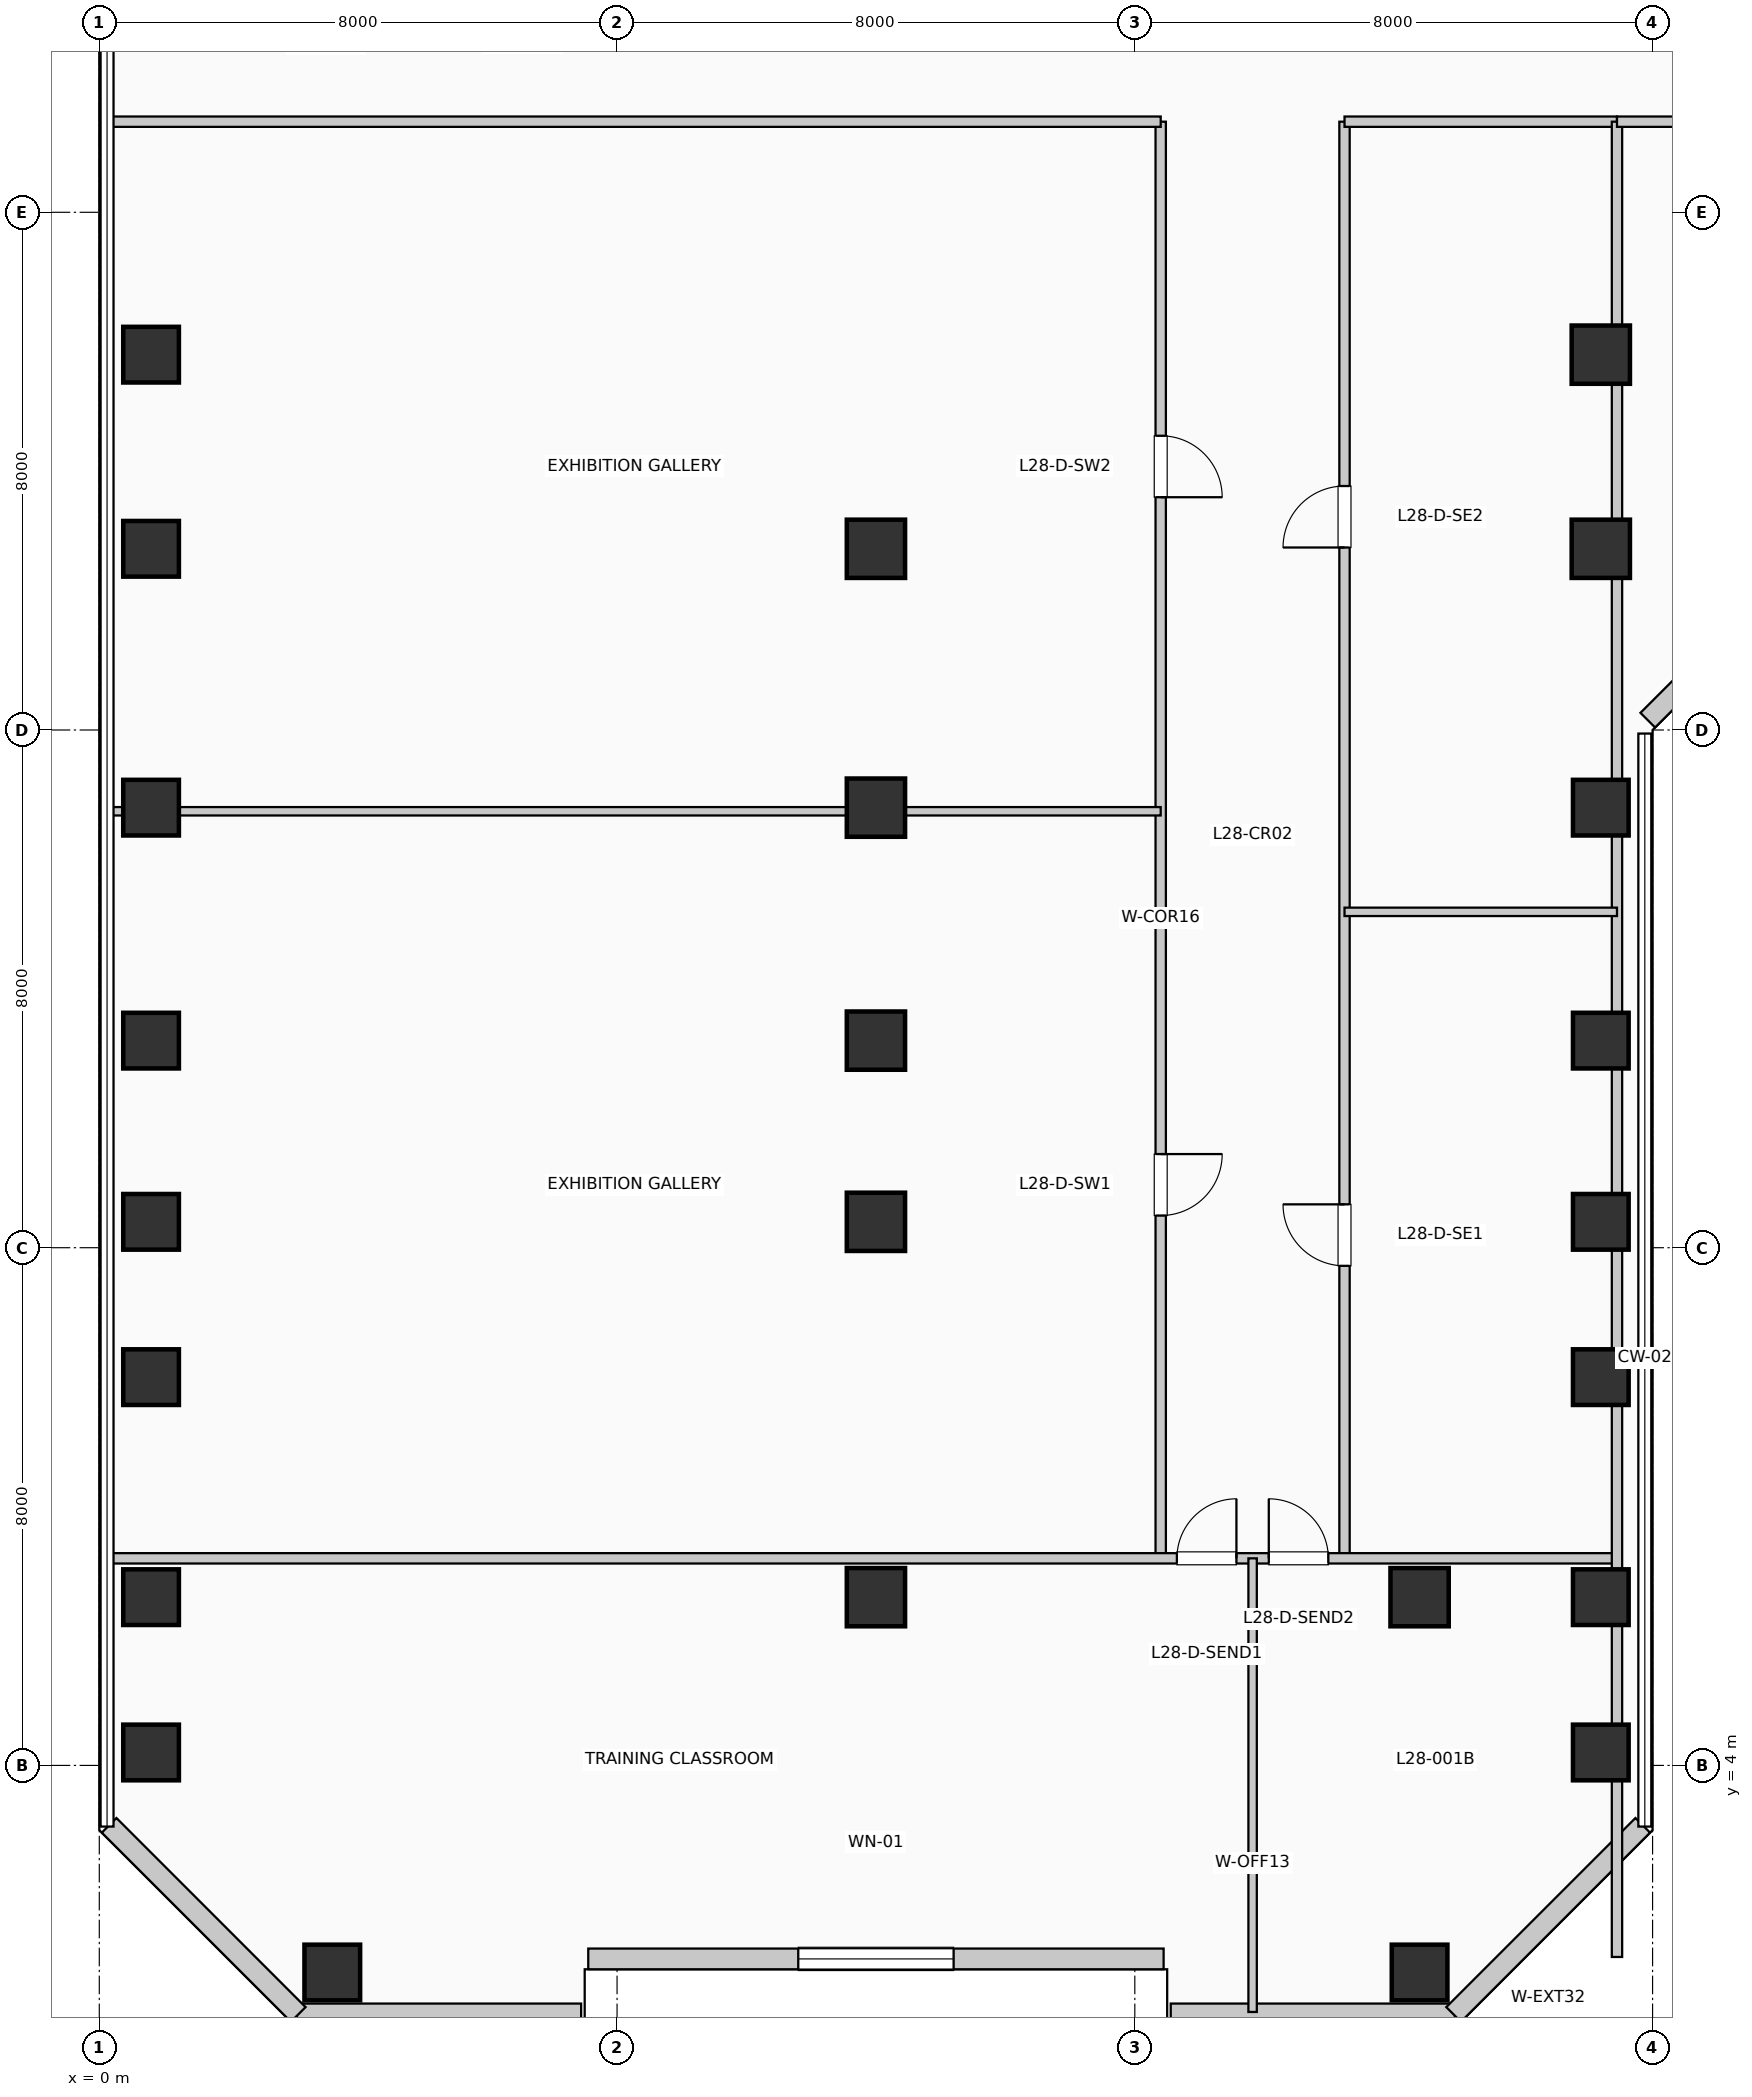
"""IFC4 building model, lengths in metres.
Left out: names, types, materials, properties, quantities, classifications, styles, units other than length and angle.
Written with IfcOpenShell. Run it as: python <this file> out.ifc"""

import sys

from ifc_helpers import new_model, si_unit, direction, frame, frame_2d, origin, origin_2d, place, context, subcontext, project, spatial, rectangle, extrude, element, fill, save


model = new_model("IFC4")
c1 = context("Model", 3, precision=1e-05, world=origin(), true_north=direction((0.0, 1.0)))
c2 = subcontext(c1, "Body", "Model", "MODEL_VIEW")
j1 = project(units=[si_unit("LENGTHUNIT", "METRE"), si_unit("PLANEANGLEUNIT", "RADIAN")], contexts=[c1])
p1 = place(None, origin())
s1 = spatial("IfcSite", under=j1, at=p1, CompositionType="ELEMENT")
p2 = place(p1, origin())
s2 = spatial("IfcBuilding", under=s1, at=p2, CompositionType="ELEMENT")
p3 = place(p2, frame((0.0, 0.0, 118.47)))
s3 = spatial("IfcBuildingStorey", under=s2, at=p3, CompositionType="ELEMENT", Elevation=118.47)
for number, where, z_axis, x_axis in (
    (1, (0.8, 4.2, 0.0), (0.0, 0.0, 1.0), (1.0, 0.0, 0.0)),
    (2, (0.8, 6.6, 0.0), (0.0, 0.0, 1.0), (1.0, 0.0, 0.0)),
    (3, (0.8, 10.0, 0.0), (0.0, 0.0, 1.0), (1.0, 0.0, 0.0)),
    (4, (0.8, 12.4, 0.0), (0.0, 0.0, 1.0), (1.0, 0.0, 0.0)),
    (5, (0.8, 15.2, 0.0), (0.0, 0.0, 1.0), (1.0, 0.0, 0.0)),
    (6, (0.8, 18.8, 0.0), (0.0, 0.0, 1.0), (1.0, 0.0, 0.0)),
    (7, (0.8, 22.8, 0.0), (0.0, 0.0, 1.0), (1.0, 0.0, 0.0)),
    (8, (0.8, 25.8, 0.0), (0.0, 0.0, 1.0), (1.0, 0.0, 0.0)),
    (9, (3.6, 0.8, 0.0), (0.0, 0.0, 1.0), (1.0, 0.0, 0.0)),
):
    element("IfcColumn", number, at=place(p3, frame(where, z_axis=z_axis, x_axis=x_axis)), inside=s3, PredefinedType="COLUMN", context=c2, shape_type="SweptSolid", body=[
        extrude(rectangle(XDim=0.86, YDim=0.86, at=origin_2d()), origin(), (0.0, 0.0, 1.0), 3.96),
    ])
for number, where, z_axis, x_axis in (
    (10, (12.0, 6.6, 0.0), (0.0, 0.0, 1.0), (1.0, 0.0, 0.0)),
    (11, (12.0, 12.4, 0.0), (0.0, 0.0, 1.0), (1.0, 0.0, 0.0)),
    (12, (12.0, 15.2, 0.0), (0.0, 0.0, 1.0), (1.0, 0.0, 0.0)),
    (13, (12.0, 18.8, 0.0), (0.0, 0.0, 1.0), (1.0, 0.0, 0.0)),
    (14, (12.0, 22.8, 0.0), (0.0, 0.0, 1.0), (1.0, 0.0, 0.0)),
):
    element("IfcColumn", number, at=place(p3, frame(where, z_axis=z_axis, x_axis=x_axis)), inside=s3, PredefinedType="COLUMN", context=c2, shape_type="SweptSolid", body=[
        extrude(rectangle(XDim=0.9, YDim=0.9, at=origin_2d()), origin(), (0.0, 0.0, 1.0), 3.96),
    ])
p4 = place(p3, frame((20.4, 0.8, 0.0), z_axis=(0.0, 0.0, 1.0), x_axis=(1.0, 0.0, 0.0)))
e15 = element("IfcColumn", 15, at=p4, inside=s3, PredefinedType="COLUMN", context=c2, shape_type="SweptSolid", body=[
    extrude(rectangle(XDim=0.86, YDim=0.86, at=origin_2d()), origin(), (0.0, 0.0, 1.0), 3.96),
])
p5 = place(p3, frame((20.4, 6.6, 0.0), z_axis=(0.0, 0.0, 1.0), x_axis=(1.0, 0.0, 0.0)))
e16 = element("IfcColumn", 16, at=p5, inside=s3, PredefinedType="COLUMN", context=c2, shape_type="SweptSolid", body=[
    extrude(rectangle(XDim=0.9, YDim=0.9, at=origin_2d()), origin(), (0.0, 0.0, 1.0), 3.96),
])
for number, where, z_axis, x_axis in (
    (17, (23.2, 4.2, 0.0), (0.0, 0.0, 1.0), (1.0, 0.0, 0.0)),
    (18, (23.2, 6.6, 0.0), (0.0, 0.0, 1.0), (1.0, 0.0, 0.0)),
    (19, (23.2, 10.0, 0.0), (0.0, 0.0, 1.0), (1.0, 0.0, 0.0)),
    (20, (23.2, 12.4, 0.0), (0.0, 0.0, 1.0), (1.0, 0.0, 0.0)),
    (21, (23.2, 15.2, 0.0), (0.0, 0.0, 1.0), (1.0, 0.0, 0.0)),
    (22, (23.2, 18.8, 0.0), (0.0, 0.0, 1.0), (1.0, 0.0, 0.0)),
):
    element("IfcColumn", number, at=place(p3, frame(where, z_axis=z_axis, x_axis=x_axis)), inside=s3, PredefinedType="COLUMN", context=c2, shape_type="SweptSolid", body=[
        extrude(rectangle(XDim=0.86, YDim=0.86, at=origin_2d()), origin(), (0.0, 0.0, 1.0), 3.96),
    ])
for number, where, z_axis, x_axis in (
    (23, (23.2, 22.8, 0.0), (0.0, 0.0, 1.0), (1.0, 0.0, 0.0)),
    (24, (23.2, 25.8, 0.0), (0.0, 0.0, 1.0), (1.0, 0.0, 0.0)),
):
    element("IfcColumn", number, at=place(p3, frame(where, z_axis=z_axis, x_axis=x_axis)), inside=s3, PredefinedType="COLUMN", context=c2, shape_type="SweptSolid", body=[
        extrude(rectangle(XDim=0.9, YDim=0.9, at=origin_2d()), origin(), (0.0, 0.0, 1.0), 3.96),
    ])
p6 = place(p3, frame((3.055, 0.16, 0.0), z_axis=(0.0, 0.0, 1.0), x_axis=(1.0, 0.0, 0.0)))
e25 = element("IfcWall", 25, at=p6, inside=s3, PredefinedType="SOLIDWALL", context=c2, shape_type="SweptSolid", body=[
    extrude(rectangle(XDim=4.39, YDim=0.32, at=frame_2d((2.195, 0.0))), origin(), (0.0, 0.0, 1.0), 3.71),
])
p7 = place(p3, frame((7.555, 1.01, 0.0), z_axis=(0.0, 0.0, 1.0), x_axis=(1.0, 0.0, 0.0)))
e26 = element("IfcWall", 26, at=p7, inside=s3, PredefinedType="SOLIDWALL", context=c2, shape_type="SweptSolid", body=[
    extrude(rectangle(XDim=8.89, YDim=0.32, at=frame_2d((4.445, 0.0))), origin(), (0.0, 0.0, 1.0), 3.71),
])
p8 = place(p7, frame((3.245, 0.0, 0.85)))
e27 = element("IfcOpeningElement", 27, at=p8, cuts=e26, PredefinedType="OPENING", context=c2, shape_type="SweptSolid", body=[
    extrude(rectangle(XDim=2.4, YDim=2.05, at=frame_2d((1.2, 1.025))), frame((0.0, 0.17, 0.0), z_axis=(0.0, -1.0, 0.0), x_axis=(1.0, 0.0, 0.0)), (0.0, 0.0, 1.0), 0.34),
])
p9 = place(p3, frame((16.555, 0.16, 0.0), z_axis=(0.0, 0.0, 1.0), x_axis=(1.0, 0.0, 0.0)))
e28 = element("IfcWall", 28, at=p9, inside=s3, PredefinedType="SOLIDWALL", context=c2, shape_type="SweptSolid", body=[
    extrude(rectangle(XDim=4.39, YDim=0.32, at=frame_2d((2.195, 0.0))), origin(), (0.0, 0.0, 1.0), 3.71),
])
p10 = place(p3, frame((20.926, 0.152, 0.0), z_axis=(0.0, 0.0, 1.0), x_axis=(0.707106781187, 0.707106781187, 0.0)))
e29 = element("IfcWall", 29, at=p10, inside=s3, PredefinedType="SOLIDWALL", context=c2, shape_type="SweptSolid", body=[
    extrude(rectangle(XDim=4.133, YDim=0.32, at=frame_2d((2.066, 0.0))), origin(), (0.0, 0.0, 1.0), 3.71),
])
p11 = place(p3, frame((23.926, 20.152, 0.0), z_axis=(0.0, 0.0, 1.0), x_axis=(0.707106781187, 0.707106781187, 0.0)))
e30 = element("IfcWall", 30, at=p11, inside=s3, PredefinedType="SOLIDWALL", context=c2, shape_type="SweptSolid", body=[
    extrude(rectangle(XDim=2.718, YDim=0.32, at=frame_2d((1.359, 0.0))), origin(), (0.0, 0.0, 1.0), 3.71),
])
p12 = place(p3, frame((0.152, 3.074, 0.0), z_axis=(0.0, 0.0, 1.0), x_axis=(0.707106781187, -0.707106781187, 0.0)))
e31 = element("IfcWall", 31, at=p12, inside=s3, PredefinedType="SOLIDWALL", context=c2, shape_type="SweptSolid", body=[
    extrude(rectangle(XDim=4.133, YDim=0.32, at=frame_2d((2.066, 0.0))), origin(), (0.0, 0.0, 1.0), 3.71),
])
p13 = place(p3, frame((16.4, 7.2, 0.0), z_axis=(0.0, 0.0, 1.0), x_axis=(0.0, 1.0, 0.0)))
e32 = element("IfcWall", 32, at=p13, inside=s3, PredefinedType="PARTITIONING", context=c2, shape_type="SweptSolid", body=[
    extrude(rectangle(XDim=22.2, YDim=0.16, at=frame_2d((11.1, 0.0))), origin(), (0.0, 0.0, 1.0), 3.71),
])
p14 = place(p13, frame((6.247, 0.0, 0.0), z_axis=(0.0, 0.0, 1.0), x_axis=(-1.0, 0.0, 0.0)))
e33 = element("IfcOpeningElement", 33, at=p14, cuts=e32, PredefinedType="OPENING", context=c2, shape_type="SweptSolid", body=[
    extrude(rectangle(XDim=0.95, YDim=2.15, at=frame_2d((0.475, 1.075))), frame((0.0, 0.09, 0.0), z_axis=(0.0, -1.0, 0.0), x_axis=(1.0, 0.0, 0.0)), (0.0, 0.0, 1.0), 0.18),
])
p15 = place(p13, frame((17.347, 0.0, 0.0), z_axis=(0.0, 0.0, 1.0), x_axis=(-1.0, 0.0, 0.0)))
e34 = element("IfcOpeningElement", 34, at=p15, cuts=e32, PredefinedType="OPENING", context=c2, shape_type="SweptSolid", body=[
    extrude(rectangle(XDim=0.95, YDim=2.15, at=frame_2d((0.475, 1.075))), frame((0.0, 0.09, 0.0), z_axis=(0.0, -1.0, 0.0), x_axis=(1.0, 0.0, 0.0)), (0.0, 0.0, 1.0), 0.18),
])
p16 = place(p3, frame((19.24, 7.2, 0.0), z_axis=(0.0, 0.0, 1.0), x_axis=(0.0, 1.0, 0.0)))
e35 = element("IfcWall", 35, at=p16, inside=s3, PredefinedType="PARTITIONING", context=c2, shape_type="SweptSolid", body=[
    extrude(rectangle(XDim=22.2, YDim=0.16, at=frame_2d((11.1, 0.0))), origin(), (0.0, 0.0, 1.0), 3.71),
])
p17 = place(p16, frame((4.52, 0.0, 0.0)))
e36 = element("IfcOpeningElement", 36, at=p17, cuts=e35, PredefinedType="OPENING", context=c2, shape_type="SweptSolid", body=[
    extrude(rectangle(XDim=0.95, YDim=2.15, at=frame_2d((0.475, 1.075))), frame((0.0, 0.09, 0.0), z_axis=(0.0, -1.0, 0.0), x_axis=(1.0, 0.0, 0.0)), (0.0, 0.0, 1.0), 0.18),
])
p18 = place(p16, frame((15.62, 0.0, 0.0)))
e37 = element("IfcOpeningElement", 37, at=p18, cuts=e35, PredefinedType="OPENING", context=c2, shape_type="SweptSolid", body=[
    extrude(rectangle(XDim=0.95, YDim=2.15, at=frame_2d((0.475, 1.075))), frame((0.0, 0.09, 0.0), z_axis=(0.0, -1.0, 0.0), x_axis=(1.0, 0.0, 0.0)), (0.0, 0.0, 1.0), 0.18),
])
p19 = place(p3, frame((0.19, 7.2, 0.0), z_axis=(0.0, 0.0, 1.0), x_axis=(1.0, 0.0, 0.0)))
e38 = element("IfcWall", 38, at=p19, inside=s3, PredefinedType="PARTITIONING", context=c2, shape_type="SweptSolid", body=[
    extrude(rectangle(XDim=23.26, YDim=0.16, at=frame_2d((11.63, 0.0))), origin(), (0.0, 0.0, 1.0), 3.71),
])
p20 = place(p19, frame((16.46, 0.0, 0.0)))
e39 = element("IfcOpeningElement", 39, at=p20, cuts=e38, PredefinedType="OPENING", context=c2, shape_type="SweptSolid", body=[
    extrude(rectangle(XDim=0.92, YDim=2.1, at=frame_2d((0.46, 1.05))), frame((0.0, 0.09, 0.0), z_axis=(0.0, -1.0, 0.0), x_axis=(1.0, 0.0, 0.0)), (0.0, 0.0, 1.0), 0.18),
])
p21 = place(p19, frame((17.88, 0.0, 0.0)))
e40 = element("IfcOpeningElement", 40, at=p21, cuts=e38, PredefinedType="OPENING", context=c2, shape_type="SweptSolid", body=[
    extrude(rectangle(XDim=0.92, YDim=2.1, at=frame_2d((0.46, 1.05))), frame((0.0, 0.09, 0.0), z_axis=(0.0, -1.0, 0.0), x_axis=(1.0, 0.0, 0.0)), (0.0, 0.0, 1.0), 0.18),
])
p22 = place(p3, frame((0.19, 29.4, 0.0), z_axis=(0.0, 0.0, 1.0), x_axis=(1.0, 0.0, 0.0)))
e41 = element("IfcWall", 41, at=p22, inside=s3, PredefinedType="PARTITIONING", context=c2, shape_type="SweptSolid", body=[
    extrude(rectangle(XDim=16.21, YDim=0.16, at=frame_2d((8.105, 0.0))), origin(), (0.0, 0.0, 1.0), 3.365),
])
p23 = place(p3, frame((19.24, 29.4, 0.0), z_axis=(0.0, 0.0, 1.0), x_axis=(1.0, 0.0, 0.0)))
e42 = element("IfcWall", 42, at=p23, inside=s3, PredefinedType="PARTITIONING", context=c2, shape_type="SweptSolid", body=[
    extrude(rectangle(XDim=4.21, YDim=0.16, at=frame_2d((2.105, 0.0))), origin(), (0.0, 0.0, 1.0), 3.71),
])
p24 = place(p3, frame((23.45, 1.04, 0.0), z_axis=(0.0, 0.0, 1.0), x_axis=(0.0, 1.0, 0.0)))
e43 = element("IfcWall", 43, at=p24, inside=s3, PredefinedType="PARTITIONING", context=c2, shape_type="SweptSolid", body=[
    extrude(rectangle(XDim=28.36, YDim=0.16, at=frame_2d((14.18, 0.0))), origin(), (0.0, 0.0, 1.0), 3.045),
])
p25 = place(p3, frame((17.82, 0.19, 0.0), z_axis=(0.0, 0.0, 1.0), x_axis=(0.0, 1.0, 0.0)))
e44 = element("IfcWall", 44, at=p25, inside=s3, PredefinedType="PARTITIONING", context=c2, shape_type="SweptSolid", body=[
    extrude(rectangle(XDim=7.01, YDim=0.13, at=frame_2d((3.505, 0.0))), origin(), (0.0, 0.0, 1.0), 3.71),
])
p26 = place(p3, frame((0.19, 18.744, 0.0), z_axis=(0.0, 0.0, 1.0), x_axis=(1.0, 0.0, 0.0)))
e45 = element("IfcWall", 45, at=p26, inside=s3, PredefinedType="PARTITIONING", context=c2, shape_type="SweptSolid", body=[
    extrude(rectangle(XDim=16.21, YDim=0.13, at=frame_2d((8.105, 0.0))), origin(), (0.0, 0.0, 1.0), 3.045),
])
p27 = place(p3, frame((19.24, 17.19, 0.0), z_axis=(0.0, 0.0, 1.0), x_axis=(1.0, 0.0, 0.0)))
e46 = element("IfcWall", 46, at=p27, inside=s3, PredefinedType="PARTITIONING", context=c2, shape_type="SweptSolid", body=[
    extrude(rectangle(XDim=4.21, YDim=0.13, at=frame_2d((2.105, 0.0))), origin(), (0.0, 0.0, 1.0), 3.71),
])
p28 = place(p3, frame((23.45, 29.4, 0.0), z_axis=(0.0, 0.0, 1.0), x_axis=(1.0, 0.0, 0.0)))
e47 = element("IfcWall", 47, at=p28, inside=s3, PredefinedType="PARTITIONING", context=c2, shape_type="SweptSolid", body=[
    extrude(rectangle(XDim=26.56, YDim=0.16, at=frame_2d((13.28, 0.0))), origin(), (0.0, 0.0, 1.0), 3.365),
])
p29 = place(p28, frame((3.795, 0.0, 0.0), z_axis=(0.0, 0.0, 1.0), x_axis=(-1.0, 0.0, 0.0)))
e48 = element("IfcOpeningElement", 48, at=p29, cuts=e47, PredefinedType="OPENING", context=c2, shape_type="SweptSolid", body=[
    extrude(rectangle(XDim=0.95, YDim=2.15, at=frame_2d((0.475, 1.075))), frame((0.0, 0.09, 0.0), z_axis=(0.0, -1.0, 0.0), x_axis=(1.0, 0.0, 0.0)), (0.0, 0.0, 1.0), 0.18),
])
p30 = place(p28, frame((11.099, 0.0, 0.0), z_axis=(0.0, 0.0, 1.0), x_axis=(-1.0, 0.0, 0.0)))
e49 = element("IfcOpeningElement", 49, at=p30, cuts=e47, PredefinedType="OPENING", context=c2, shape_type="SweptSolid", body=[
    extrude(rectangle(XDim=0.95, YDim=2.15, at=frame_2d((0.475, 1.075))), frame((0.0, 0.09, 0.0), z_axis=(0.0, -1.0, 0.0), x_axis=(1.0, 0.0, 0.0)), (0.0, 0.0, 1.0), 0.18),
])
p31 = place(p28, frame((21.059, 0.0, 0.0), z_axis=(0.0, 0.0, 1.0), x_axis=(-1.0, 0.0, 0.0)))
e50 = element("IfcOpeningElement", 50, at=p31, cuts=e47, PredefinedType="OPENING", context=c2, shape_type="SweptSolid", body=[
    extrude(rectangle(XDim=0.95, YDim=2.15, at=frame_2d((0.475, 1.075))), frame((0.0, 0.09, 0.0), z_axis=(0.0, -1.0, 0.0), x_axis=(1.0, 0.0, 0.0)), (0.0, 0.0, 1.0), 0.18),
])
p32 = place(p8, origin())
e51 = element("IfcWindow", 51, at=p32, inside=s3, PartitioningType="SINGLE_PANEL", PredefinedType="WINDOW", context=c2, shape_type="SweptSolid", body=[
    extrude(rectangle(XDim=2.4, YDim=2.05, at=frame_2d((1.2, 1.025))), frame((0.0, 0.03, 0.0), z_axis=(0.0, -1.0, 0.0), x_axis=(1.0, 0.0, 0.0)), (0.0, 0.0, 1.0), 0.06),
])
fill(e27, e51)
p33 = place(p20, origin())
e52 = element("IfcDoor", 52, at=p33, inside=s3, OperationType="SINGLE_SWING_RIGHT", PredefinedType="DOOR", context=c2, shape_type="SweptSolid", body=[
    extrude(rectangle(XDim=0.92, YDim=2.1, at=frame_2d((0.46, 1.05))), frame((0.0, 0.025, 0.0), z_axis=(0.0, -1.0, 0.0), x_axis=(1.0, 0.0, 0.0)), (0.0, 0.0, 1.0), 0.05),
])
fill(e39, e52)
p34 = place(p21, origin())
e53 = element("IfcDoor", 53, at=p34, inside=s3, OperationType="SINGLE_SWING_LEFT", PredefinedType="DOOR", context=c2, shape_type="SweptSolid", body=[
    extrude(rectangle(XDim=0.92, YDim=2.1, at=frame_2d((0.46, 1.05))), frame((0.0, 0.025, 0.0), z_axis=(0.0, -1.0, 0.0), x_axis=(1.0, 0.0, 0.0)), (0.0, 0.0, 1.0), 0.05),
])
fill(e40, e53)
p35 = place(p14, origin())
e54 = element("IfcDoor", 54, at=p35, inside=s3, OperationType="SINGLE_SWING_RIGHT", PredefinedType="DOOR", context=c2, shape_type="SweptSolid", body=[
    extrude(rectangle(XDim=0.95, YDim=2.15, at=frame_2d((0.475, 1.075))), frame((0.0, 0.025, 0.0), z_axis=(0.0, -1.0, 0.0), x_axis=(1.0, 0.0, 0.0)), (0.0, 0.0, 1.0), 0.05),
])
fill(e33, e54)
p36 = place(p15, origin())
e55 = element("IfcDoor", 55, at=p36, inside=s3, OperationType="SINGLE_SWING_LEFT", PredefinedType="DOOR", context=c2, shape_type="SweptSolid", body=[
    extrude(rectangle(XDim=0.95, YDim=2.15, at=frame_2d((0.475, 1.075))), frame((0.0, 0.025, 0.0), z_axis=(0.0, -1.0, 0.0), x_axis=(1.0, 0.0, 0.0)), (0.0, 0.0, 1.0), 0.05),
])
fill(e34, e55)
p37 = place(p17, origin())
e56 = element("IfcDoor", 56, at=p37, inside=s3, OperationType="SINGLE_SWING_RIGHT", PredefinedType="DOOR", context=c2, shape_type="SweptSolid", body=[
    extrude(rectangle(XDim=0.95, YDim=2.15, at=frame_2d((0.475, 1.075))), frame((0.0, 0.025, 0.0), z_axis=(0.0, -1.0, 0.0), x_axis=(1.0, 0.0, 0.0)), (0.0, 0.0, 1.0), 0.05),
])
fill(e36, e56)
p38 = place(p18, origin())
e57 = element("IfcDoor", 57, at=p38, inside=s3, OperationType="SINGLE_SWING_LEFT", PredefinedType="DOOR", context=c2, shape_type="SweptSolid", body=[
    extrude(rectangle(XDim=0.95, YDim=2.15, at=frame_2d((0.475, 1.075))), frame((0.0, 0.025, 0.0), z_axis=(0.0, -1.0, 0.0), x_axis=(1.0, 0.0, 0.0)), (0.0, 0.0, 1.0), 0.05),
])
fill(e37, e57)
save(model, sys.argv[1])
